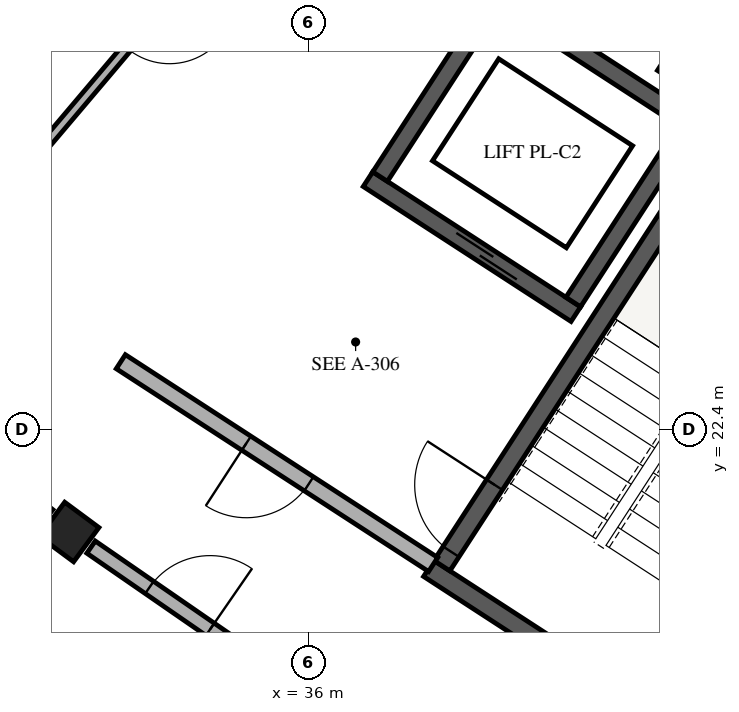
"""IFC4 building model, lengths in metres.
Left out: names, types, materials, properties, quantities, classifications, styles, units other than length and angle.
Written with IfcOpenShell. Run it as: python <this file> out.ifc"""

import sys

from ifc_helpers import new_model, si_unit, direction, frame, frame_2d, origin, origin_2d, place, context, subcontext, project, spatial, rectangle, extrude, element, fill, save


model = new_model("IFC4")
c1 = context("Model", 3, precision=1e-05, world=origin(), true_north=direction((0.0, 1.0)))
c2 = subcontext(c1, "Body", "Model", "MODEL_VIEW")
j1 = project(units=[si_unit("LENGTHUNIT", "METRE"), si_unit("PLANEANGLEUNIT", "RADIAN")], contexts=[c1])
p1 = place(None, origin())
s1 = spatial("IfcSite", under=j1, at=p1, CompositionType="ELEMENT")
p2 = place(p1, origin())
s2 = spatial("IfcBuilding", under=s1, at=p2, CompositionType="ELEMENT")
p3 = place(p2, frame((0.0, 0.0, 18.92)))
s3 = spatial("IfcBuildingStorey", under=s2, at=p3, CompositionType="ELEMENT", Elevation=18.92)
p4 = place(p3, frame((40.413, 18.882, 0.0), z_axis=(0.0, 0.0, 1.0), x_axis=(0.544629435258, 0.838676802022, 0.0)))
e1 = element("IfcWall", 1, at=p4, inside=s3, PredefinedType="SHEAR", context=c2, shape_type="SweptSolid", body=[
    extrude(rectangle(XDim=6.6, YDim=0.25, at=frame_2d((3.3, 0.0))), origin(), (0.0, 0.0, 1.0), 3.11),
])
p5 = place(p3, frame((40.449, 18.709, 0.0), z_axis=(0.0, 0.0, 1.0), x_axis=(-0.838678407117, 0.544626963559, 0.0)))
e2 = element("IfcWall", 2, at=p5, inside=s3, PredefinedType="SHEAR", context=c2, shape_type="SweptSolid", body=[
    extrude(rectangle(XDim=3.42, YDim=0.25, at=frame_2d((1.71, 0.0))), origin(), (0.0, 0.0, 1.0), 3.11),
])
p6 = place(p3, frame((37.754, 20.608, 0.0), z_axis=(0.0, 0.0, 1.0), x_axis=(0.544655453679, 0.838659905312, 0.0)))
e3 = element("IfcWall", 3, at=p6, inside=s3, PredefinedType="SHEAR", context=c2, shape_type="SweptSolid", body=[
    extrude(rectangle(XDim=6.6, YDim=0.25, at=frame_2d((3.3, 0.0))), origin(), (0.0, 0.0, 1.0), 3.11),
])
p7 = place(p6, frame((0.22, 0.0, 0.0)))
e4 = element("IfcOpeningElement", 4, at=p7, cuts=e3, PredefinedType="OPENING", context=c2, shape_type="SweptSolid", body=[
    extrude(rectangle(XDim=1.05, YDim=2.15, at=frame_2d((0.525, 1.075))), frame((0.0, 0.135, 0.0), z_axis=(0.0, -1.0, 0.0), x_axis=(1.0, 0.0, 0.0)), (0.0, 0.0, 1.0), 0.27),
])
p8 = place(p3, frame((39.516, 23.917, 0.0), z_axis=(0.0, 0.0, 1.0), x_axis=(-0.838660840752, 0.544654013286, 0.0)))
e5 = element("IfcWall", 5, at=p8, inside=s3, PredefinedType="SHEAR", context=c2, shape_type="SweptSolid", body=[
    extrude(rectangle(XDim=3.26, YDim=0.23, at=frame_2d((1.63, 0.0))), origin(), (0.0, 0.0, 1.0), 3.11),
])
p9 = place(p8, frame((0.9, 0.0, 0.0)))
e6 = element("IfcOpeningElement", 6, at=p9, cuts=e5, PredefinedType="OPENING", context=c2, shape_type="SweptSolid", body=[
    extrude(rectangle(XDim=1.0, YDim=2.15, at=frame_2d((0.5, 1.075))), frame((0.0, 0.125, 0.0), z_axis=(0.0, -1.0, 0.0), x_axis=(1.0, 0.0, 0.0)), (0.0, 0.0, 1.0), 0.25),
])
p10 = place(p3, frame((41.112, 26.375, 0.0), z_axis=(0.0, 0.0, 1.0), x_axis=(-0.838638623546, 0.544688221919, 0.0)))
e7 = element("IfcWall", 7, at=p10, inside=s3, PredefinedType="SHEAR", context=c2, shape_type="SweptSolid", body=[
    extrude(rectangle(XDim=3.26, YDim=0.23, at=frame_2d((1.63, 0.0))), origin(), (0.0, 0.0, 1.0), 3.11),
])
p11 = place(p3, frame((39.482, 24.077, 0.0), z_axis=(0.0, 0.0, 1.0), x_axis=(0.544686387605, 0.838639814913, 0.0)))
e8 = element("IfcWall", 8, at=p11, inside=s3, PredefinedType="SHEAR", context=c2, shape_type="SweptSolid", body=[
    extrude(rectangle(XDim=2.7, YDim=0.23, at=frame_2d((1.35, 0.0))), origin(), (0.0, 0.0, 1.0), 3.11),
])
p12 = place(p3, frame((36.941, 25.727, 0.0), z_axis=(0.0, 0.0, 1.0), x_axis=(0.544622789439, 0.838681117722, 0.0)))
e9 = element("IfcWall", 9, at=p12, inside=s3, PredefinedType="SHEAR", context=c2, shape_type="SweptSolid", body=[
    extrude(rectangle(XDim=2.7, YDim=0.23, at=frame_2d((1.35, 0.0))), origin(), (0.0, 0.0, 1.0), 3.11),
])
p13 = place(p3, frame((32.85, 21.052, 0.0), z_axis=(0.0, 0.0, 1.0), x_axis=(-0.594822786751, -0.803856860617, 0.0)))
e10 = element("IfcColumn", 10, at=p13, inside=s3, PredefinedType="COLUMN", context=c2, shape_type="SweptSolid", body=[
    extrude(rectangle(XDim=0.56, YDim=0.56, at=origin_2d()), origin(), (0.0, 0.0, 1.0), 3.11),
])
p14 = place(p3, frame((40.954, 27.116, 0.0), z_axis=(0.0, 0.0, 1.0), x_axis=(-0.540974471368, -0.841039012964, 0.0)))
e11 = element("IfcColumn", 11, at=p14, inside=s3, PredefinedType="PILASTER", context=c2, shape_type="SweptSolid", body=[
    extrude(rectangle(XDim=0.38, YDim=0.62, at=origin_2d()), origin(), (0.0, 0.0, 1.0), 3.11),
])
p15 = place(p3, frame((37.639, 20.623, 0.0), z_axis=(0.0, 0.0, 1.0), x_axis=(-0.838681446513, 0.544622283124, 0.0)))
e12 = element("IfcWall", 12, at=p15, inside=s3, PredefinedType="PARTITIONING", context=c2, shape_type="SweptSolid", body=[
    extrude(rectangle(XDim=4.9, YDim=0.22, at=frame_2d((2.45, 0.0))), origin(), (0.0, 0.0, 1.0), 2.34),
])
p16 = place(p15, frame((1.95, 0.0, 0.0)))
e13 = element("IfcOpeningElement", 13, at=p16, cuts=e12, PredefinedType="OPENING", context=c2, shape_type="SweptSolid", body=[
    extrude(rectangle(XDim=0.98, YDim=2.14, at=frame_2d((0.49, 1.07))), frame((0.0, 0.12, 0.0), z_axis=(0.0, -1.0, 0.0), x_axis=(1.0, 0.0, 0.0)), (0.0, 0.0, 1.0), 0.24),
])
p17 = place(p3, frame((36.021, 30.269, 0.0), z_axis=(0.0, 0.0, 1.0), x_axis=(-0.646121311019, -0.763234728932, 0.0)))
e14 = element("IfcWall", 14, at=p17, inside=s3, PredefinedType="PARTITIONING", context=c2, shape_type="SweptSolid", body=[
    extrude(rectangle(XDim=6.6, YDim=0.125, at=frame_2d((3.3, 0.0))), origin(), (0.0, 0.0, 1.0), 2.37),
])
p18 = place(p17, frame((2.865, 0.0, 0.0)))
e15 = element("IfcOpeningElement", 15, at=p18, cuts=e14, PredefinedType="OPENING", context=c2, shape_type="SweptSolid", body=[
    extrude(rectangle(XDim=0.87, YDim=2.08, at=frame_2d((0.435, 1.04))), frame((0.0, 0.073, 0.0), z_axis=(0.0, -1.0, 0.0), x_axis=(1.0, 0.0, 0.0)), (0.0, 0.0, 1.0), 0.145),
])
p19 = place(p3, frame((30.351, 23.03, 0.0), z_axis=(0.0, 0.0, 1.0), x_axis=(0.783965548427, -0.620804332201, 0.0)))
e16 = element("IfcWall", 16, at=p19, inside=s3, PredefinedType="PARTITIONING", context=c2, shape_type="SweptSolid", body=[
    extrude(rectangle(XDim=2.837, YDim=0.195, at=frame_2d((1.418, 0.0))), origin(), (0.0, 0.0, 1.0), 2.37),
])
p20 = place(p19, frame((0.924, 0.0, 0.0)))
e17 = element("IfcOpeningElement", 17, at=p20, cuts=e16, PredefinedType="OPENING", context=c2, shape_type="SweptSolid", body=[
    extrude(rectangle(XDim=0.99, YDim=2.16, at=frame_2d((0.495, 1.08))), frame((0.0, 0.107, 0.0), z_axis=(0.0, -1.0, 0.0), x_axis=(1.0, 0.0, 0.0)), (0.0, 0.0, 1.0), 0.215),
])
p21 = place(p3, frame((33.138, 20.853, 0.0), z_axis=(0.0, 0.0, 1.0), x_axis=(0.822870075235, -0.568229565653, 0.0)))
e18 = element("IfcWall", 18, at=p21, inside=s3, PredefinedType="PARTITIONING", context=c2, shape_type="SweptSolid", body=[
    extrude(rectangle(XDim=2.837, YDim=0.195, at=frame_2d((1.418, 0.0))), origin(), (0.0, 0.0, 1.0), 2.37),
])
p22 = place(p21, frame((0.934, 0.0, 0.0)))
e19 = element("IfcOpeningElement", 19, at=p22, cuts=e18, PredefinedType="OPENING", context=c2, shape_type="SweptSolid", body=[
    extrude(rectangle(XDim=0.97, YDim=2.15, at=frame_2d((0.485, 1.075))), frame((0.0, 0.107, 0.0), z_axis=(0.0, -1.0, 0.0), x_axis=(1.0, 0.0, 0.0)), (0.0, 0.0, 1.0), 0.215),
])
p23 = place(p7, origin())
e20 = element("IfcDoor", 20, at=p23, inside=s3, OperationType="SINGLE_SWING_RIGHT", PredefinedType="DOOR", context=c2, shape_type="SweptSolid", body=[
    extrude(rectangle(XDim=1.05, YDim=2.15, at=frame_2d((0.525, 1.075))), frame((0.0, 0.025, 0.0), z_axis=(0.0, -1.0, 0.0), x_axis=(1.0, 0.0, 0.0)), (0.0, 0.0, 1.0), 0.05),
])
fill(e4, e20)
p24 = place(p9, origin())
e21 = element("IfcDoor", 21, at=p24, inside=s3, OperationType="DOUBLE_DOOR_SLIDING", PredefinedType="DOOR", context=c2, shape_type="SweptSolid", body=[
    extrude(rectangle(XDim=1.0, YDim=2.15, at=frame_2d((0.5, 1.075))), frame((0.0, 0.025, 0.0), z_axis=(0.0, -1.0, 0.0), x_axis=(1.0, 0.0, 0.0)), (0.0, 0.0, 1.0), 0.05),
])
fill(e6, e21)
p25 = place(p16, origin())
e22 = element("IfcDoor", 22, at=p25, inside=s3, OperationType="SINGLE_SWING_RIGHT", PredefinedType="DOOR", context=c2, shape_type="SweptSolid", body=[
    extrude(rectangle(XDim=0.98, YDim=2.14, at=frame_2d((0.49, 1.07))), frame((0.0, 0.025, 0.0), z_axis=(0.0, -1.0, 0.0), x_axis=(1.0, 0.0, 0.0)), (0.0, 0.0, 1.0), 0.05),
])
fill(e13, e22)
p26 = place(p22, origin())
e23 = element("IfcDoor", 23, at=p26, inside=s3, OperationType="SINGLE_SWING_RIGHT", PredefinedType="DOOR", context=c2, shape_type="SweptSolid", body=[
    extrude(rectangle(XDim=0.97, YDim=2.15, at=frame_2d((0.485, 1.075))), frame((0.0, 0.025, 0.0), z_axis=(0.0, -1.0, 0.0), x_axis=(1.0, 0.0, 0.0)), (0.0, 0.0, 1.0), 0.05),
])
fill(e19, e23)
save(model, sys.argv[1])
